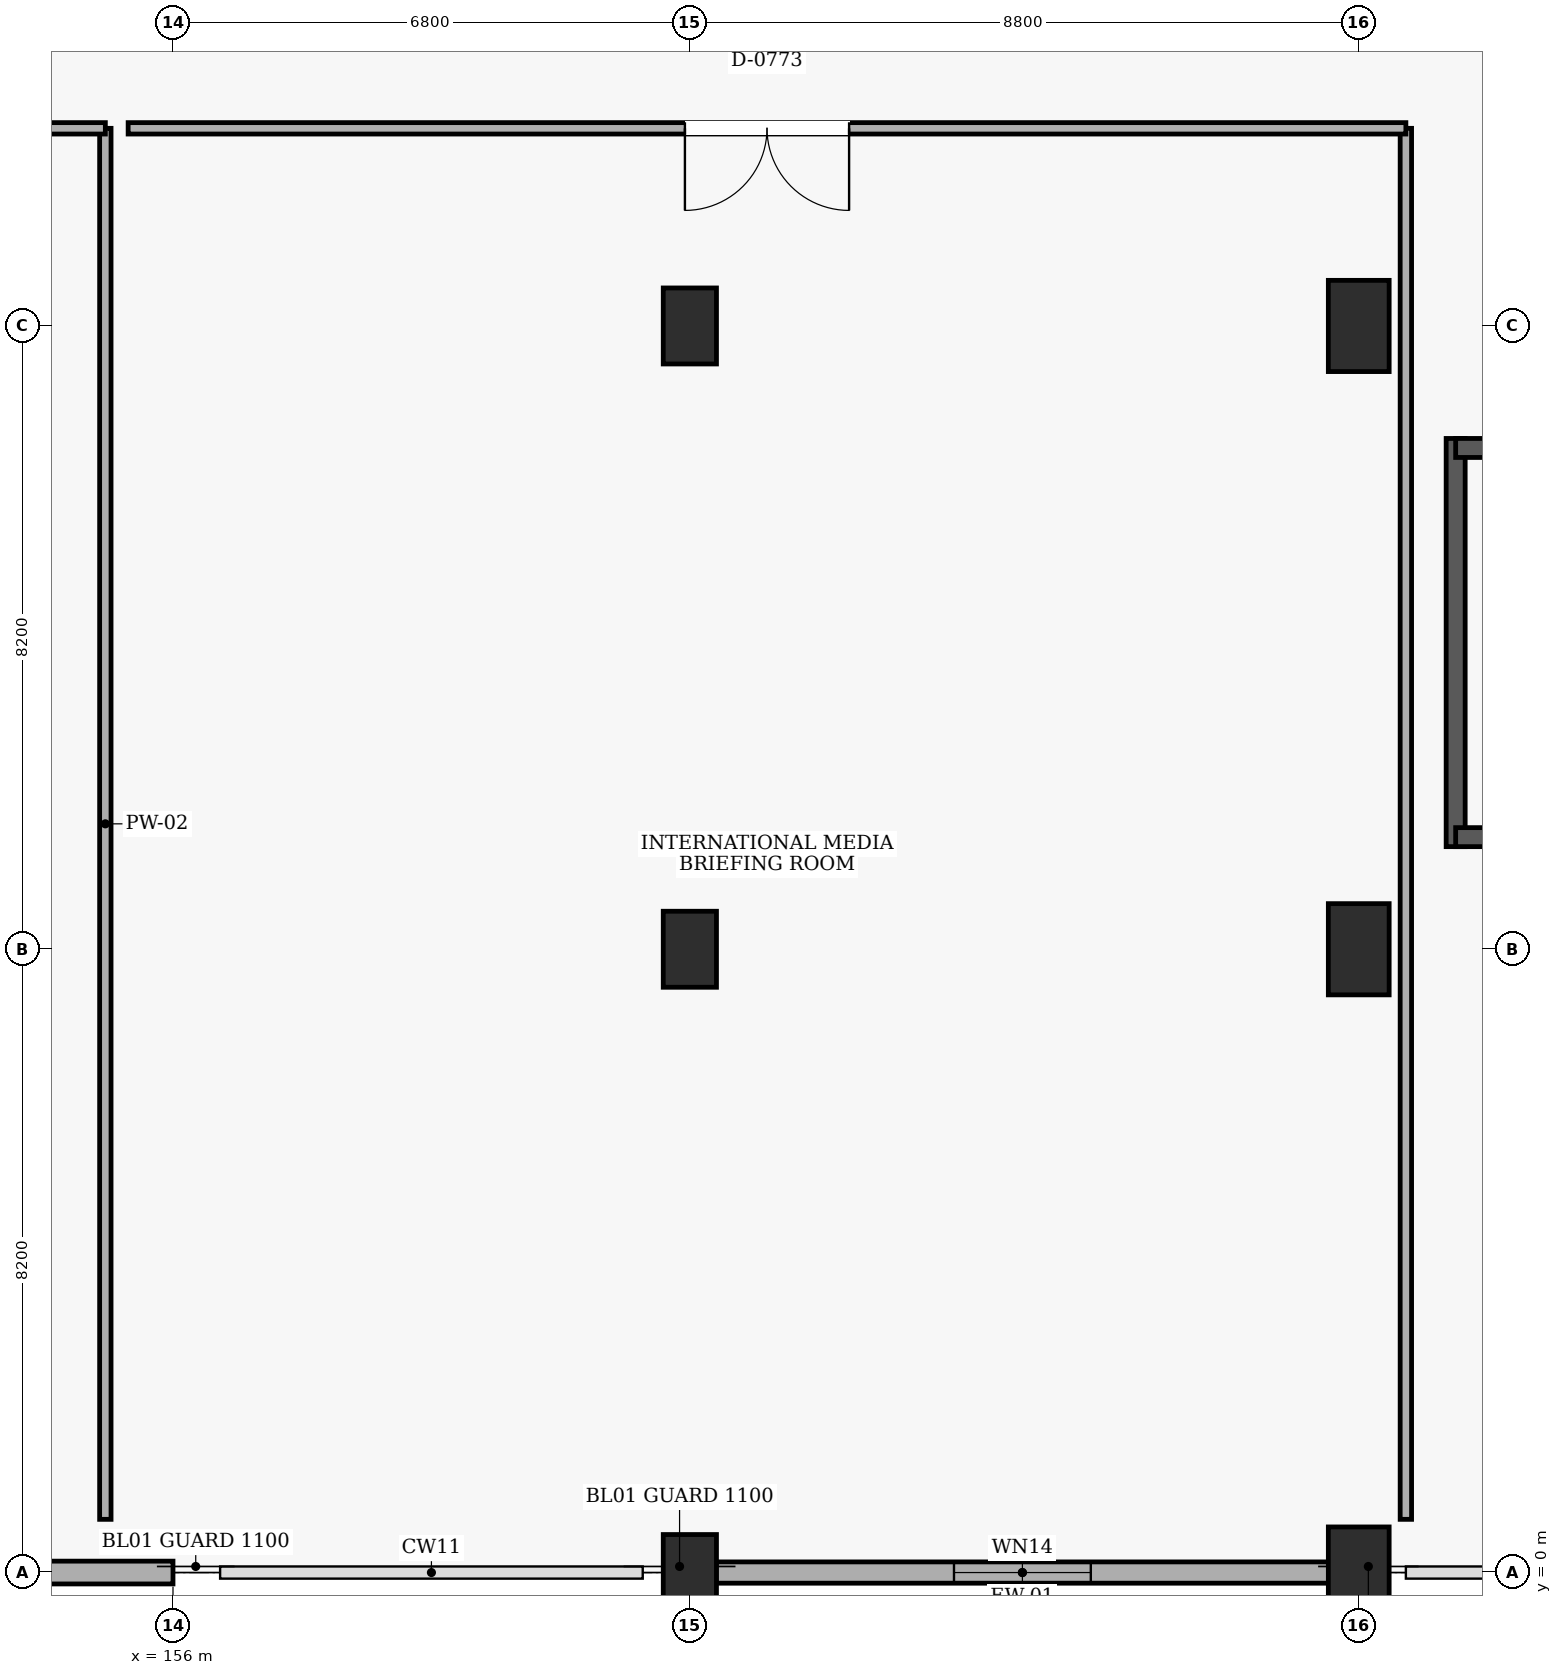
"""IFC4 building model, lengths in metres.
Left out: names, types, materials, properties, quantities, classifications, styles, units other than length and angle.
Written with IfcOpenShell. Run it as: python <this file> out.ifc"""

import sys

from ifc_helpers import new_model, si_unit, direction, frame, frame_2d, origin, origin_2d, place, context, subcontext, project, spatial, rectangle, extrude, element, fill, save


model = new_model("IFC4")
c1 = context("Model", 3, precision=1e-05, world=origin(), true_north=direction((0.0, 1.0)))
c2 = subcontext(c1, "Body", "Model", "MODEL_VIEW")
j1 = project(units=[si_unit("LENGTHUNIT", "METRE"), si_unit("PLANEANGLEUNIT", "RADIAN")], contexts=[c1])
p1 = place(None, origin())
s1 = spatial("IfcSite", under=j1, at=p1, CompositionType="ELEMENT")
p2 = place(p1, origin())
s2 = spatial("IfcBuilding", under=s1, at=p2, CompositionType="ELEMENT")
p3 = place(p2, frame((0.0, 0.0, 19.8)))
s3 = spatial("IfcBuildingStorey", under=s2, at=p3, CompositionType="ELEMENT", Elevation=19.8)
for number, where, z_axis, x_axis in (
    (1, (162.8, 0.0, 0.0), (0.0, 0.0, 1.0), (1.0, 0.0, 0.0)),
    (2, (162.8, 8.2, 0.0), (0.0, 0.0, 1.0), (1.0, 0.0, 0.0)),
    (3, (162.8, 16.4, 0.0), (0.0, 0.0, 1.0), (1.0, 0.0, 0.0)),
):
    element("IfcColumn", number, at=place(p3, frame(where, z_axis=z_axis, x_axis=x_axis)), inside=s3, PredefinedType="COLUMN", context=c2, shape_type="SweptSolid", body=[
        extrude(rectangle(XDim=0.7, YDim=1.0, at=origin_2d()), origin(), (0.0, 0.0, 1.0), 4.8),
    ])
for number, where, z_axis, x_axis in (
    (4, (171.6, 0.0, 0.0), (0.0, 0.0, 1.0), (1.0, 0.0, 0.0)),
    (5, (171.6, 8.2, 0.0), (0.0, 0.0, 1.0), (1.0, 0.0, 0.0)),
    (6, (171.6, 16.4, 0.0), (0.0, 0.0, 1.0), (1.0, 0.0, 0.0)),
):
    element("IfcColumn", number, at=place(p3, frame(where, z_axis=z_axis, x_axis=x_axis)), inside=s3, PredefinedType="COLUMN", context=c2, shape_type="SweptSolid", body=[
        extrude(rectangle(XDim=0.8, YDim=1.2, at=origin_2d()), origin(), (0.0, 0.0, 1.0), 4.8),
    ])
p4 = place(p3, frame((171.205, 0.0, 0.0), z_axis=(0.0, 0.0, 1.0), x_axis=(-1.0, 0.0, 0.0)))
e7 = element("IfcWall", 7, at=p4, inside=s3, PredefinedType="SOLIDWALL", context=c2, shape_type="SweptSolid", body=[
    extrude(rectangle(XDim=8.06, YDim=0.28, at=frame_2d((4.03, 0.0))), origin(), (0.0, 0.0, 1.0), 3.68),
])
p5 = place(p4, frame((3.13, 0.0, 0.9)))
e8 = element("IfcOpeningElement", 8, at=p5, cuts=e7, PredefinedType="OPENING", context=c2, shape_type="SweptSolid", body=[
    extrude(rectangle(XDim=1.8, YDim=2.1, at=frame_2d((0.9, 1.05))), frame((0.0, 0.15, 0.0), z_axis=(0.0, -1.0, 0.0), x_axis=(1.0, 0.0, 0.0)), (0.0, 0.0, 1.0), 0.3),
])
p6 = place(p3, frame((156.0, 0.0, 0.0), z_axis=(0.0, 0.0, 1.0), x_axis=(-1.0, 0.0, 0.0)))
e9 = element("IfcWall", 9, at=p6, inside=s3, PredefinedType="SOLIDWALL", context=c2, shape_type="SweptSolid", body=[
    extrude(rectangle(XDim=34.0, YDim=0.3, at=frame_2d((17.0, 0.0))), origin(), (0.0, 0.0, 1.0), 4.48),
])
p7 = place(p6, frame((15.9, 0.0, 0.9)))
e10 = element("IfcOpeningElement", 10, at=p7, cuts=e9, PredefinedType="OPENING", context=c2, shape_type="SweptSolid", body=[
    extrude(rectangle(XDim=2.2, YDim=2.1, at=frame_2d((1.1, 1.05))), frame((0.0, 0.16, 0.0), z_axis=(0.0, -1.0, 0.0), x_axis=(1.0, 0.0, 0.0)), (0.0, 0.0, 1.0), 0.32),
])
p8 = place(p3, frame((172.875, 14.92, 0.0), z_axis=(0.0, 0.0, 1.0), x_axis=(0.0, -1.0, 0.0)))
e11 = element("IfcWall", 11, at=p8, inside=s3, PredefinedType="SHEAR", context=c2, shape_type="SweptSolid", body=[
    extrude(rectangle(XDim=5.37, YDim=0.25, at=frame_2d((2.685, 0.0))), origin(), (0.0, 0.0, 1.0), 4.5),
])
p9 = place(p3, frame((172.875, 14.795, 0.0), z_axis=(0.0, 0.0, 1.0), x_axis=(1.0, 0.0, 0.0)))
e12 = element("IfcWall", 12, at=p9, inside=s3, PredefinedType="SHEAR", context=c2, shape_type="SweptSolid", body=[
    extrude(rectangle(XDim=10.85, YDim=0.25, at=frame_2d((5.425, 0.0))), origin(), (0.0, 0.0, 1.0), 4.5),
])
p10 = place(p9, frame((0.52, 0.0, 0.0)))
e13 = element("IfcOpeningElement", 13, at=p10, cuts=e12, PredefinedType="OPENING", context=c2, shape_type="SweptSolid", body=[
    extrude(rectangle(XDim=1.4, YDim=2.15, at=frame_2d((0.7, 1.075))), frame((0.0, 0.135, 0.0), z_axis=(0.0, -1.0, 0.0), x_axis=(1.0, 0.0, 0.0)), (0.0, 0.0, 1.0), 0.27),
])
p11 = place(p3, frame((172.875, 9.675, 0.0), z_axis=(0.0, 0.0, 1.0), x_axis=(1.0, 0.0, 0.0)))
e14 = element("IfcWall", 14, at=p11, inside=s3, PredefinedType="SHEAR", context=c2, shape_type="SweptSolid", body=[
    extrude(rectangle(XDim=10.85, YDim=0.25, at=frame_2d((5.425, 0.0))), origin(), (0.0, 0.0, 1.0), 4.5),
])
p12 = place(p3, frame((155.11, 0.7, 0.0), z_axis=(0.0, 0.0, 1.0), x_axis=(0.0, 1.0, 0.0)))
e15 = element("IfcWall", 15, at=p12, inside=s3, PredefinedType="PARTITIONING", context=c2, shape_type="SweptSolid", body=[
    extrude(rectangle(XDim=18.3, YDim=0.15, at=frame_2d((9.15, 0.0))), origin(), (0.0, 0.0, 1.0), 4.5),
])
p13 = place(p3, frame((155.11, 19.0, 0.0), z_axis=(0.0, 0.0, 1.0), x_axis=(-1.0, 0.0, 0.0)))
e16 = element("IfcWall", 16, at=p13, inside=s3, PredefinedType="PARTITIONING", context=c2, shape_type="SweptSolid", body=[
    extrude(rectangle(XDim=32.84, YDim=0.15, at=frame_2d((16.42, 0.0))), origin(), (0.0, 0.0, 1.0), 4.5),
])
p14 = place(p13, frame((15.38, 0.0, 0.0)))
e17 = element("IfcOpeningElement", 17, at=p14, cuts=e16, PredefinedType="OPENING", context=c2, shape_type="SweptSolid", body=[
    extrude(rectangle(XDim=2.08, YDim=2.35, at=frame_2d((1.04, 1.175))), frame((0.0, 0.085, 0.0), z_axis=(0.0, -1.0, 0.0), x_axis=(1.0, 0.0, 0.0)), (0.0, 0.0, 1.0), 0.17),
])
p15 = place(p3, frame((172.22, 0.7, 0.0), z_axis=(0.0, 0.0, 1.0), x_axis=(0.0, 1.0, 0.0)))
e18 = element("IfcWall", 18, at=p15, inside=s3, PredefinedType="PARTITIONING", context=c2, shape_type="SweptSolid", body=[
    extrude(rectangle(XDim=18.3, YDim=0.15, at=frame_2d((9.15, 0.0))), origin(), (0.0, 0.0, 1.0), 4.5),
])
p16 = place(p3, frame((172.22, 19.0, 0.0), z_axis=(0.0, 0.0, 1.0), x_axis=(-1.0, 0.0, 0.0)))
e19 = element("IfcWall", 19, at=p16, inside=s3, PredefinedType="PARTITIONING", context=c2, shape_type="SweptSolid", body=[
    extrude(rectangle(XDim=16.81, YDim=0.15, at=frame_2d((8.405, 0.0))), origin(), (0.0, 0.0, 1.0), 4.5),
])
p17 = place(p16, frame((7.325, 0.0, 0.0)))
e20 = element("IfcOpeningElement", 20, at=p17, cuts=e19, PredefinedType="OPENING", context=c2, shape_type="SweptSolid", body=[
    extrude(rectangle(XDim=2.16, YDim=2.35, at=frame_2d((1.08, 1.175))), frame((0.0, 0.085, 0.0), z_axis=(0.0, -1.0, 0.0), x_axis=(1.0, 0.0, 0.0)), (0.0, 0.0, 1.0), 0.17),
])
p18 = place(p5, origin())
e21 = element("IfcWindow", 21, at=p18, inside=s3, PartitioningType="SINGLE_PANEL", PredefinedType="WINDOW", context=c2, shape_type="SweptSolid", body=[
    extrude(rectangle(XDim=1.8, YDim=2.1, at=frame_2d((0.9, 1.05))), frame((0.0, 0.03, 0.0), z_axis=(0.0, -1.0, 0.0), x_axis=(1.0, 0.0, 0.0)), (0.0, 0.0, 1.0), 0.06),
])
fill(e8, e21)
p19 = place(p17, origin())
e22 = element("IfcDoor", 22, at=p19, inside=s3, OperationType="DOUBLE_DOOR_SINGLE_SWING", PredefinedType="DOOR", context=c2, shape_type="SweptSolid", body=[
    extrude(rectangle(XDim=2.16, YDim=2.35, at=frame_2d((1.08, 1.175))), frame((0.0, 0.025, 0.0), z_axis=(0.0, -1.0, 0.0), x_axis=(1.0, 0.0, 0.0)), (0.0, 0.0, 1.0), 0.05),
])
fill(e20, e22)
save(model, sys.argv[1])
